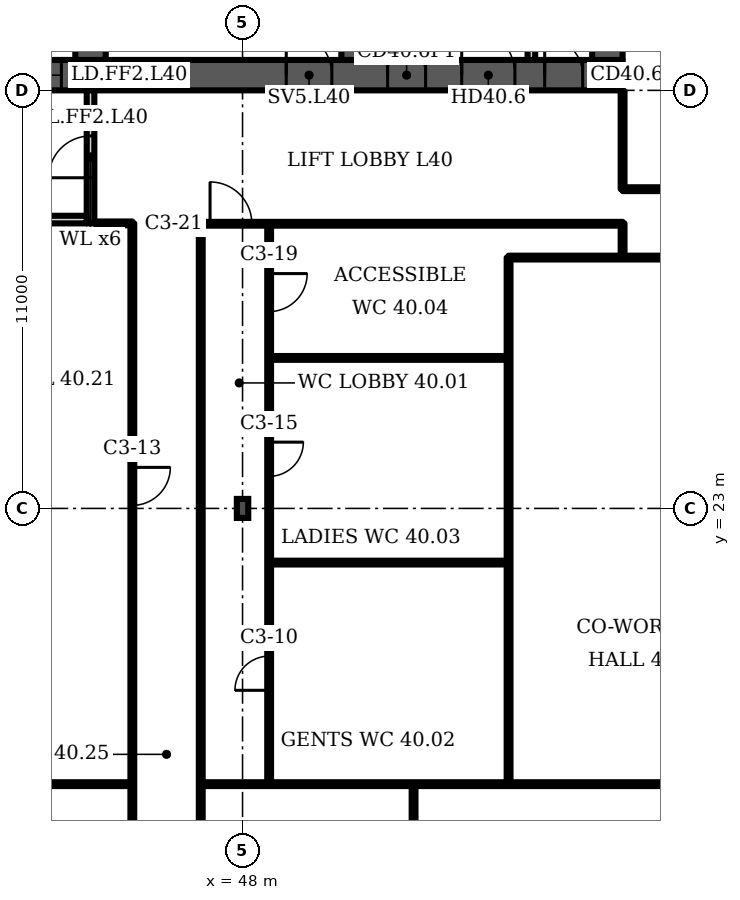
"""IFC4 building model, lengths in metres.
Left out: names, types, materials, properties, quantities, classifications, styles, units other than length and angle.
Written with IfcOpenShell. Run it as: python <this file> out.ifc"""

import sys

from ifc_helpers import new_model, si_unit, direction, frame, frame_2d, origin, origin_2d, place, context, subcontext, project, spatial, polyline, rectangle, i_section, outline, extrude, element, fill, save


model = new_model("IFC4")
c1 = context("Model", 3, precision=1e-05, world=origin(), true_north=direction((0.0, 1.0)))
c2 = subcontext(c1, "Body", "Model", "MODEL_VIEW")
j1 = project(units=[si_unit("LENGTHUNIT", "METRE"), si_unit("PLANEANGLEUNIT", "RADIAN")], contexts=[c1])
p1 = place(None, origin())
s1 = spatial("IfcSite", under=j1, at=p1, CompositionType="ELEMENT")
p2 = place(p1, origin())
s2 = spatial("IfcBuilding", under=s1, at=p2, CompositionType="ELEMENT")
p3 = place(p2, frame((0.0, 0.0, 166.3)))
s3 = spatial("IfcBuildingStorey", under=s2, at=p3, CompositionType="ELEMENT", Elevation=166.3)
p4 = place(p3, frame((16.0, 34.4, 0.0), z_axis=(0.0, 0.0, 1.0), x_axis=(1.0, 0.0, 0.0)))
e1 = element("IfcWall", 1, at=p4, inside=s3, PredefinedType="SHEAR", context=c2, shape_type="SweptSolid", body=[
    extrude(rectangle(XDim=42.0, YDim=0.8, at=frame_2d((21.0, 0.0))), origin(), (0.0, 0.0, 1.0), 3.6),
])
p5 = place(p4, frame((3.2, 0.0, 0.0)))
e2 = element("IfcOpeningElement", 2, at=p5, cuts=e1, PredefinedType="OPENING", context=c2, shape_type="SweptSolid", body=[
    extrude(rectangle(XDim=1.0, YDim=2.1, at=frame_2d((0.5, 1.05))), frame((0.0, 0.41, 0.0), z_axis=(0.0, -1.0, 0.0), x_axis=(1.0, 0.0, 0.0)), (0.0, 0.0, 1.0), 0.82),
])
p6 = place(p4, frame((7.65, 0.0, 0.0)))
e3 = element("IfcOpeningElement", 3, at=p6, cuts=e1, PredefinedType="OPENING", context=c2, shape_type="SweptSolid", body=[
    extrude(rectangle(XDim=1.2, YDim=2.1, at=frame_2d((0.6, 1.05))), frame((0.0, 0.41, 0.0), z_axis=(0.0, -1.0, 0.0), x_axis=(1.0, 0.0, 0.0)), (0.0, 0.0, 1.0), 0.82),
])
p7 = place(p4, frame((14.767, 0.0, 0.0)))
e4 = element("IfcOpeningElement", 4, at=p7, cuts=e1, PredefinedType="OPENING", context=c2, shape_type="SweptSolid", body=[
    extrude(rectangle(XDim=1.1, YDim=2.1, at=frame_2d((0.55, 1.05))), frame((0.0, 0.41, 0.0), z_axis=(0.0, -1.0, 0.0), x_axis=(1.0, 0.0, 0.0)), (0.0, 0.0, 1.0), 0.82),
])
p8 = place(p4, frame((19.133, 0.0, 0.0)))
e5 = element("IfcOpeningElement", 5, at=p8, cuts=e1, PredefinedType="OPENING", context=c2, shape_type="SweptSolid", body=[
    extrude(rectangle(XDim=1.1, YDim=2.1, at=frame_2d((0.55, 1.05))), frame((0.0, 0.41, 0.0), z_axis=(0.0, -1.0, 0.0), x_axis=(1.0, 0.0, 0.0)), (0.0, 0.0, 1.0), 0.82),
])
p9 = place(p4, frame((16.8, 0.0, 0.0)))
e6 = element("IfcOpeningElement", 6, at=p9, cuts=e1, PredefinedType="OPENING", context=c2, shape_type="SweptSolid", body=[
    extrude(rectangle(XDim=1.4, YDim=2.1, at=frame_2d((0.7, 1.05))), frame((0.0, 0.41, 0.0), z_axis=(0.0, -1.0, 0.0), x_axis=(1.0, 0.0, 0.0)), (0.0, 0.0, 1.0), 0.82),
])
p10 = place(p4, frame((21.767, 0.0, 0.0)))
e7 = element("IfcOpeningElement", 7, at=p10, cuts=e1, PredefinedType="OPENING", context=c2, shape_type="SweptSolid", body=[
    extrude(rectangle(XDim=1.1, YDim=2.1, at=frame_2d((0.55, 1.05))), frame((0.0, 0.41, 0.0), z_axis=(0.0, -1.0, 0.0), x_axis=(1.0, 0.0, 0.0)), (0.0, 0.0, 1.0), 0.82),
])
p11 = place(p4, frame((23.95, 0.0, 0.0)))
e8 = element("IfcOpeningElement", 8, at=p11, cuts=e1, PredefinedType="OPENING", context=c2, shape_type="SweptSolid", body=[
    extrude(rectangle(XDim=1.1, YDim=2.1, at=frame_2d((0.55, 1.05))), frame((0.0, 0.41, 0.0), z_axis=(0.0, -1.0, 0.0), x_axis=(1.0, 0.0, 0.0)), (0.0, 0.0, 1.0), 0.82),
])
p12 = place(p4, frame((26.133, 0.0, 0.0)))
e9 = element("IfcOpeningElement", 9, at=p12, cuts=e1, PredefinedType="OPENING", context=c2, shape_type="SweptSolid", body=[
    extrude(rectangle(XDim=1.1, YDim=2.1, at=frame_2d((0.55, 1.05))), frame((0.0, 0.41, 0.0), z_axis=(0.0, -1.0, 0.0), x_axis=(1.0, 0.0, 0.0)), (0.0, 0.0, 1.0), 0.82),
])
p13 = place(p4, frame((33.15, 0.0, 0.0)))
e10 = element("IfcOpeningElement", 10, at=p13, cuts=e1, PredefinedType="OPENING", context=c2, shape_type="SweptSolid", body=[
    extrude(rectangle(XDim=1.2, YDim=2.1, at=frame_2d((0.6, 1.05))), frame((0.0, 0.41, 0.0), z_axis=(0.0, -1.0, 0.0), x_axis=(1.0, 0.0, 0.0)), (0.0, 0.0, 1.0), 0.82),
])
p14 = place(p4, frame((35.817, 0.0, 0.0)))
e11 = element("IfcOpeningElement", 11, at=p14, cuts=e1, PredefinedType="OPENING", context=c2, shape_type="SweptSolid", body=[
    extrude(rectangle(XDim=1.0, YDim=2.1, at=frame_2d((0.5, 1.05))), frame((0.0, 0.41, 0.0), z_axis=(0.0, -1.0, 0.0), x_axis=(1.0, 0.0, 0.0)), (0.0, 0.0, 1.0), 0.82),
])
p15 = place(p4, frame((39.95, 0.0, 0.0)))
e12 = element("IfcOpeningElement", 12, at=p15, cuts=e1, PredefinedType="OPENING", context=c2, shape_type="SweptSolid", body=[
    extrude(rectangle(XDim=1.0, YDim=2.1, at=frame_2d((0.5, 1.05))), frame((0.0, 0.41, 0.0), z_axis=(0.0, -1.0, 0.0), x_axis=(1.0, 0.0, 0.0)), (0.0, 0.0, 1.0), 0.82),
])
p16 = place(p4, frame((37.767, 0.0, 0.0)))
e13 = element("IfcOpeningElement", 13, at=p16, cuts=e1, PredefinedType="OPENING", context=c2, shape_type="SweptSolid", body=[
    extrude(rectangle(XDim=1.4, YDim=2.1, at=frame_2d((0.7, 1.05))), frame((0.0, 0.41, 0.0), z_axis=(0.0, -1.0, 0.0), x_axis=(1.0, 0.0, 0.0)), (0.0, 0.0, 1.0), 0.82),
])
p17 = place(p3, frame((44.0, 34.8, 0.0), z_axis=(0.0, 0.0, 1.0), x_axis=(0.0, 1.0, 0.0)))
e14 = element("IfcWall", 14, at=p17, inside=s3, PredefinedType="SHEAR", context=c2, shape_type="SweptSolid", body=[
    extrude(rectangle(XDim=14.374, YDim=0.8, at=frame_2d((7.187, 0.0))), origin(), (0.0, 0.0, 1.0), 3.6),
])
p18 = place(p17, frame((11.312, 0.0, 0.0)))
e15 = element("IfcOpeningElement", 15, at=p18, cuts=e14, PredefinedType="OPENING", context=c2, shape_type="SweptSolid", body=[
    extrude(rectangle(XDim=1.0, YDim=2.1, at=frame_2d((0.5, 1.05))), frame((0.0, 0.41, 0.0), z_axis=(0.0, -1.0, 0.0), x_axis=(1.0, 0.0, 0.0)), (0.0, 0.0, 1.0), 0.82),
])
p19 = place(p17, frame((3.6, 0.0, 0.0)))
e16 = element("IfcOpeningElement", 16, at=p19, cuts=e14, PredefinedType="OPENING", context=c2, shape_type="SweptSolid", body=[
    extrude(rectangle(XDim=1.1, YDim=2.1, at=frame_2d((0.55, 1.05))), frame((0.0, 0.41, 0.0), z_axis=(0.0, -1.0, 0.0), x_axis=(1.0, 0.0, 0.0)), (0.0, 0.0, 1.0), 0.82),
])
p20 = place(p3, frame((51.0, 34.8, 0.0), z_axis=(0.0, 0.0, 1.0), x_axis=(0.0, 1.0, 0.0)))
e17 = element("IfcWall", 17, at=p20, inside=s3, PredefinedType="SHEAR", context=c2, shape_type="SweptSolid", body=[
    extrude(rectangle(XDim=13.762, YDim=0.8, at=frame_2d((6.881, 0.0))), origin(), (0.0, 0.0, 1.0), 3.6),
])
p21 = place(p20, frame((3.6, 0.0, 0.0)))
e18 = element("IfcOpeningElement", 18, at=p21, cuts=e17, PredefinedType="OPENING", context=c2, shape_type="SweptSolid", body=[
    extrude(rectangle(XDim=1.1, YDim=2.1, at=frame_2d((0.55, 1.05))), frame((0.0, 0.41, 0.0), z_axis=(0.0, -1.0, 0.0), x_axis=(1.0, 0.0, 0.0)), (0.0, 0.0, 1.0), 0.82),
])
p22 = place(p3, frame((57.6, 34.8, 0.0), z_axis=(0.0, 0.0, 1.0), x_axis=(0.0, 1.0, 0.0)))
e19 = element("IfcWall", 19, at=p22, inside=s3, PredefinedType="SHEAR", context=c2, shape_type="SweptSolid", body=[
    extrude(rectangle(XDim=13.184, YDim=0.8, at=frame_2d((6.592, 0.0))), origin(), (0.0, 0.0, 1.0), 3.6),
])
p23 = place(p3, frame((48.0, 23.0, 0.0), z_axis=(0.0, 0.0, 1.0), x_axis=(1.0, 0.0, 0.0)))
e20 = element("IfcColumn", 20, at=p23, inside=s3, PredefinedType="COLUMN", context=c2, shape_type="SweptSolid", body=[
    extrude(i_section(OverallWidth=0.3, OverallDepth=0.5, WebThickness=0.014, FlangeThickness=0.028, FilletRadius=0.027, at=origin_2d()), origin(), (0.0, 0.0, 1.0), 3.6),
])
p24 = place(p3, frame((0.0, 0.0, -0.0)))
e21 = element("IfcWall", 21, at=p24, inside=s3, PredefinedType="PARTITIONING", context=c2, shape_type="SweptSolid", body=[
    extrude(outline(polyline([(41.567, 37.1), (39.433, 37.1), (39.433, 34.8), (39.233, 34.8), (39.233, 37.65), (37.4, 37.65), (37.4, 37.85), (39.233, 37.85), (39.433, 37.85), (39.433, 37.3), (41.567, 37.3), (41.567, 37.55), (41.767, 37.55), (43.6, 37.55), (43.6, 37.35), (41.767, 37.35), (41.767, 34.8), (41.567, 34.8), (41.567, 37.1)])), origin(), (0.0, 0.0, 1.0), 3.2),
])
p25 = place(p3, frame((0.0, 0.0, -0.0)))
e22 = element("IfcWall", 22, at=p25, inside=s3, PredefinedType="PARTITIONING", context=c2, shape_type="SweptSolid", body=[
    extrude(outline(polyline([(53.233, 34.8), (53.233, 37.3), (53.433, 37.3), (53.433, 34.8), (53.233, 34.8)])), origin(), (0.0, 0.0, 1.0), 3.2),
])
p26 = place(p3, frame((0.0, 0.0, -0.0)))
e23 = element("IfcWall", 23, at=p26, inside=s3, PredefinedType="PARTITIONING", context=c2, shape_type="SweptSolid", body=[
    extrude(outline(polyline([(55.5, 34.8), (55.5, 37.3), (55.7, 37.3), (55.7, 34.8), (55.5, 34.8)])), origin(), (0.0, 0.0, 1.0), 3.2),
])
p27 = place(p3, frame((44.0, 30.5, 0.0), z_axis=(0.0, 0.0, 1.0), x_axis=(0.0, 1.0, 0.0)))
e24 = element("IfcWall", 24, at=p27, inside=s3, PredefinedType="PARTITIONING", context=c2, shape_type="SweptSolid", body=[
    extrude(rectangle(XDim=3.5, YDim=0.2, at=frame_2d((1.75, 0.0))), origin(), (0.0, 0.0, 1.0), 3.2),
])
p28 = place(p27, frame((1.2, 0.0, 0.0)))
e25 = element("IfcOpeningElement", 25, at=p28, cuts=e24, PredefinedType="OPENING", context=c2, shape_type="SweptSolid", body=[
    extrude(rectangle(XDim=1.1, YDim=2.1, at=frame_2d((0.55, 1.05))), frame((0.0, 0.11, 0.0), z_axis=(0.0, -1.0, 0.0), x_axis=(1.0, 0.0, 0.0)), (0.0, 0.0, 1.0), 0.22),
])
p29 = place(p3, frame((41.1, 30.6, 0.0), z_axis=(0.0, 0.0, 1.0), x_axis=(1.0, 0.0, 0.0)))
e26 = element("IfcWall", 26, at=p29, inside=s3, PredefinedType="PARTITIONING", context=c2, shape_type="SweptSolid", body=[
    extrude(rectangle(XDim=2.8, YDim=0.2, at=frame_2d((1.4, 0.0))), origin(), (0.0, 0.0, 1.0), 3.2),
])
p30 = place(p3, frame((27.4, 15.745, 0.0), z_axis=(0.0, 0.0, 1.0), x_axis=(1.0, 0.0, 0.0)))
e27 = element("IfcWall", 27, at=p30, inside=s3, PredefinedType="PARTITIONING", context=c2, shape_type="SweptSolid", body=[
    extrude(rectangle(XDim=17.7, YDim=0.1, at=frame_2d((8.85, 0.0))), origin(), (0.0, 0.0, 1.0), 3.2),
])
p31 = place(p3, frame((45.1, 1.087, 0.0), z_axis=(0.0, 0.0, 1.0), x_axis=(0.0, 1.0, 0.0)))
e28 = element("IfcWall", 28, at=p31, inside=s3, PredefinedType="PARTITIONING", context=c2, shape_type="SweptSolid", body=[
    extrude(rectangle(XDim=29.413, YDim=0.1, at=frame_2d((14.707, 0.0))), origin(), (0.0, 0.0, 1.0), 3.2),
])
p32 = place(p31, frame((6.438, 0.0, 0.0)))
e29 = element("IfcOpeningElement", 29, at=p32, cuts=e28, PredefinedType="OPENING", context=c2, shape_type="SweptSolid", body=[
    extrude(rectangle(XDim=1.8, YDim=2.1, at=frame_2d((0.9, 1.05))), frame((0.0, 0.06, 0.0), z_axis=(0.0, -1.0, 0.0), x_axis=(1.0, 0.0, 0.0)), (0.0, 0.0, 1.0), 0.12),
])
p33 = place(p31, frame((21.993, 0.0, 0.0)))
e30 = element("IfcOpeningElement", 30, at=p33, cuts=e28, PredefinedType="OPENING", context=c2, shape_type="SweptSolid", body=[
    extrude(rectangle(XDim=1.0, YDim=2.1, at=frame_2d((0.5, 1.05))), frame((0.0, 0.06, 0.0), z_axis=(0.0, -1.0, 0.0), x_axis=(1.0, 0.0, 0.0)), (0.0, 0.0, 1.0), 0.12),
])
p34 = place(p3, frame((46.9, 1.087, 0.0), z_axis=(0.0, 0.0, 1.0), x_axis=(0.0, 1.0, 0.0)))
e31 = element("IfcWall", 31, at=p34, inside=s3, PredefinedType="PARTITIONING", context=c2, shape_type="SweptSolid", body=[
    extrude(rectangle(XDim=29.403, YDim=0.1, at=frame_2d((14.702, 0.0))), origin(), (0.0, 0.0, 1.0), 3.2),
])
p35 = place(p34, frame((6.798, 0.0, 0.0)))
e32 = element("IfcOpeningElement", 32, at=p35, cuts=e31, PredefinedType="OPENING", context=c2, shape_type="SweptSolid", body=[
    extrude(rectangle(XDim=1.0, YDim=2.1, at=frame_2d((0.5, 1.05))), frame((0.0, 0.06, 0.0), z_axis=(0.0, -1.0, 0.0), x_axis=(1.0, 0.0, 0.0)), (0.0, 0.0, 1.0), 0.12),
])
p36 = place(p3, frame((46.91, 15.745, 0.0), z_axis=(0.0, 0.0, 1.0), x_axis=(1.0, 0.0, 0.0)))
e33 = element("IfcWall", 33, at=p36, inside=s3, PredefinedType="PARTITIONING", context=c2, shape_type="SweptSolid", body=[
    extrude(rectangle(XDim=17.69, YDim=0.1, at=frame_2d((8.845, 0.0))), origin(), (0.0, 0.0, 1.0), 3.2),
])
p37 = place(p3, frame((46.91, 30.49, 0.0), z_axis=(0.0, 0.0, 1.0), x_axis=(1.0, 0.0, 0.0)))
e34 = element("IfcWall", 34, at=p37, inside=s3, PredefinedType="PARTITIONING", context=c2, shape_type="SweptSolid", body=[
    extrude(rectangle(XDim=11.09, YDim=0.1, at=frame_2d((5.545, 0.0))), origin(), (0.0, 0.0, 1.0), 3.2),
])
p38 = place(p37, frame((0.235, 0.0, 0.0)))
e35 = element("IfcOpeningElement", 35, at=p38, cuts=e34, PredefinedType="OPENING", context=c2, shape_type="SweptSolid", body=[
    extrude(rectangle(XDim=1.1, YDim=2.1, at=frame_2d((0.55, 1.05))), frame((0.0, 0.06, 0.0), z_axis=(0.0, -1.0, 0.0), x_axis=(1.0, 0.0, 0.0)), (0.0, 0.0, 1.0), 0.12),
])
p39 = place(p3, frame((48.7, 15.745, 0.0), z_axis=(0.0, 0.0, 1.0), x_axis=(0.0, 1.0, 0.0)))
e36 = element("IfcWall", 36, at=p39, inside=s3, PredefinedType="PARTITIONING", context=c2, shape_type="SweptSolid", body=[
    extrude(rectangle(XDim=14.745, YDim=0.1, at=frame_2d((7.373, 0.0))), origin(), (0.0, 0.0, 1.0), 3.2),
])
p40 = place(p39, frame((2.469, 0.0, 0.0)))
e37 = element("IfcOpeningElement", 37, at=p40, cuts=e36, PredefinedType="OPENING", context=c2, shape_type="SweptSolid", body=[
    extrude(rectangle(XDim=0.9, YDim=2.1, at=frame_2d((0.45, 1.05))), frame((0.0, 0.06, 0.0), z_axis=(0.0, -1.0, 0.0), x_axis=(1.0, 0.0, 0.0)), (0.0, 0.0, 1.0), 0.12),
])
p41 = place(p39, frame((8.099, 0.0, 0.0)))
e38 = element("IfcOpeningElement", 38, at=p41, cuts=e36, PredefinedType="OPENING", context=c2, shape_type="SweptSolid", body=[
    extrude(rectangle(XDim=0.9, YDim=2.1, at=frame_2d((0.45, 1.05))), frame((0.0, 0.06, 0.0), z_axis=(0.0, -1.0, 0.0), x_axis=(1.0, 0.0, 0.0)), (0.0, 0.0, 1.0), 0.12),
])
p42 = place(p39, frame((12.434, 0.0, 0.0)))
e39 = element("IfcOpeningElement", 39, at=p42, cuts=e36, PredefinedType="OPENING", context=c2, shape_type="SweptSolid", body=[
    extrude(rectangle(XDim=1.0, YDim=2.1, at=frame_2d((0.5, 1.05))), frame((0.0, 0.06, 0.0), z_axis=(0.0, -1.0, 0.0), x_axis=(1.0, 0.0, 0.0)), (0.0, 0.0, 1.0), 0.12),
])
for number, where, z_axis, x_axis in (
    (40, (48.7, 21.575, 0.0), (0.0, 0.0, 1.0), (1.0, 0.0, 0.0)),
    (41, (48.7, 26.96, 0.0), (0.0, 0.0, 1.0), (1.0, 0.0, 0.0)),
):
    element("IfcWall", number, at=place(p3, frame(where, z_axis=z_axis, x_axis=x_axis)), inside=s3, PredefinedType="PARTITIONING", context=c2, shape_type="SweptSolid", body=[
        extrude(rectangle(XDim=6.3, YDim=0.1, at=frame_2d((3.15, 0.0))), origin(), (0.0, 0.0, 1.0), 3.2),
    ])
p43 = place(p3, frame((52.5, 1.98, 0.0), z_axis=(0.0, 0.0, 1.0), x_axis=(0.0, 1.0, 0.0)))
e42 = element("IfcWall", 42, at=p43, inside=s3, PredefinedType="PARTITIONING", context=c2, shape_type="SweptSolid", body=[
    extrude(rectangle(XDim=13.765, YDim=0.1, at=frame_2d((6.883, 0.0))), origin(), (0.0, 0.0, 1.0), 3.2),
])
p44 = place(p3, frame((55.0, 15.745, 0.0), z_axis=(0.0, 0.0, 1.0), x_axis=(0.0, 1.0, 0.0)))
e43 = element("IfcWall", 43, at=p44, inside=s3, PredefinedType="PARTITIONING", context=c2, shape_type="SweptSolid", body=[
    extrude(rectangle(XDim=13.855, YDim=0.1, at=frame_2d((6.927, 0.0))), origin(), (0.0, 0.0, 1.0), 3.2),
])
p45 = place(p3, frame((55.0, 29.6, 0.0), z_axis=(0.0, 0.0, 1.0), x_axis=(1.0, 0.0, 0.0)))
e44 = element("IfcWall", 44, at=p45, inside=s3, PredefinedType="PARTITIONING", context=c2, shape_type="SweptSolid", body=[
    extrude(rectangle(XDim=6.44, YDim=0.1, at=frame_2d((3.22, 0.0))), origin(), (0.0, 0.0, 1.0), 3.2),
])
p46 = place(p3, frame((58.0, 29.6, 0.0), z_axis=(0.0, 0.0, 1.0), x_axis=(0.0, 1.0, 0.0)))
e45 = element("IfcWall", 45, at=p46, inside=s3, PredefinedType="PARTITIONING", context=c2, shape_type="SweptSolid", body=[
    extrude(rectangle(XDim=0.9, YDim=0.1, at=frame_2d((0.45, 0.0))), origin(), (0.0, 0.0, 1.0), 3.2),
])
p47 = place(p3, frame((58.0, 31.4, 0.0), z_axis=(0.0, 0.0, 1.0), x_axis=(0.0, 1.0, 0.0)))
e46 = element("IfcWall", 46, at=p47, inside=s3, PredefinedType="PARTITIONING", context=c2, shape_type="SweptSolid", body=[
    extrude(rectangle(XDim=2.58, YDim=0.1, at=frame_2d((1.29, 0.0))), origin(), (0.0, 0.0, 1.0), 3.2),
])
p48 = place(p3, frame((58.0, 31.4, 0.0), z_axis=(0.0, 0.0, 1.0), x_axis=(1.0, 0.0, 0.0)))
e47 = element("IfcWall", 47, at=p48, inside=s3, PredefinedType="PARTITIONING", context=c2, shape_type="SweptSolid", body=[
    extrude(rectangle(XDim=8.4, YDim=0.1, at=frame_2d((4.2, 0.0))), origin(), (0.0, 0.0, 1.0), 3.2),
])
p49 = place(p48, frame((3.98, 0.0, 0.0)))
e48 = element("IfcOpeningElement", 48, at=p49, cuts=e47, PredefinedType="OPENING", context=c2, shape_type="SweptSolid", body=[
    extrude(rectangle(XDim=1.8, YDim=2.1, at=frame_2d((0.9, 1.05))), frame((0.0, 0.06, 0.0), z_axis=(0.0, -1.0, 0.0), x_axis=(1.0, 0.0, 0.0)), (0.0, 0.0, 1.0), 0.12),
])
p50 = place(p3, frame((44.15, 30.5, 0.0), z_axis=(0.0, 0.0, 1.0), x_axis=(1.0, 0.0, 0.0)))
e49 = element("IfcWall", 49, at=p50, inside=s3, PredefinedType="PARTITIONING", context=c2, shape_type="SweptSolid", body=[
    extrude(rectangle(XDim=0.95, YDim=0.1, at=frame_2d((0.475, 0.0))), origin(), (0.0, 0.0, 1.0), 3.2),
])
p51 = place(p12, origin())
e50 = element("IfcDoor", 50, at=p51, inside=s3, OperationType="DOUBLE_DOOR_SLIDING", PredefinedType="DOOR", context=c2, shape_type="SweptSolid", body=[
    extrude(rectangle(XDim=1.1, YDim=2.1, at=frame_2d((0.55, 1.05))), frame((0.0, 0.025, 0.0), z_axis=(0.0, -1.0, 0.0), x_axis=(1.0, 0.0, 0.0)), (0.0, 0.0, 1.0), 0.05),
])
fill(e9, e50)
p52 = place(p13, origin())
e51 = element("IfcDoor", 51, at=p52, inside=s3, OperationType="SINGLE_SWING_LEFT", PredefinedType="DOOR", context=c2, shape_type="SweptSolid", body=[
    extrude(rectangle(XDim=1.2, YDim=2.1, at=frame_2d((0.6, 1.05))), frame((0.0, 0.025, 0.0), z_axis=(0.0, -1.0, 0.0), x_axis=(1.0, 0.0, 0.0)), (0.0, 0.0, 1.0), 0.05),
])
fill(e10, e51)
p53 = place(p14, origin())
e52 = element("IfcDoor", 52, at=p53, inside=s3, OperationType="SINGLE_SWING_LEFT", PredefinedType="DOOR", context=c2, shape_type="SweptSolid", body=[
    extrude(rectangle(XDim=1.0, YDim=2.1, at=frame_2d((0.5, 1.05))), frame((0.0, 0.4, 0.0), z_axis=(0.0, -1.0, 0.0), x_axis=(1.0, 0.0, 0.0)), (0.0, 0.0, 1.0), 0.8),
])
fill(e11, e52)
p54 = place(p15, origin())
e53 = element("IfcDoor", 53, at=p54, inside=s3, OperationType="SINGLE_SWING_LEFT", PredefinedType="DOOR", context=c2, shape_type="SweptSolid", body=[
    extrude(rectangle(XDim=1.0, YDim=2.1, at=frame_2d((0.5, 1.05))), frame((0.0, 0.4, 0.0), z_axis=(0.0, -1.0, 0.0), x_axis=(1.0, 0.0, 0.0)), (0.0, 0.0, 1.0), 0.8),
])
fill(e12, e53)
p55 = place(p16, origin())
e54 = element("IfcDoor", 54, at=p55, inside=s3, OperationType="DOUBLE_DOOR_SINGLE_SWING", PredefinedType="DOOR", context=c2, shape_type="SweptSolid", body=[
    extrude(rectangle(XDim=1.4, YDim=2.1, at=frame_2d((0.7, 1.05))), frame((0.0, 0.025, 0.0), z_axis=(0.0, -1.0, 0.0), x_axis=(1.0, 0.0, 0.0)), (0.0, 0.0, 1.0), 0.05),
])
fill(e13, e54)
p56 = place(p28, origin())
e55 = element("IfcDoor", 55, at=p56, inside=s3, OperationType="SINGLE_SWING_LEFT", PredefinedType="DOOR", context=c2, shape_type="SweptSolid", body=[
    extrude(rectangle(XDim=1.1, YDim=2.1, at=frame_2d((0.55, 1.05))), frame((0.0, 0.025, 0.0), z_axis=(0.0, -1.0, 0.0), x_axis=(1.0, 0.0, 0.0)), (0.0, 0.0, 1.0), 0.05),
])
fill(e25, e55)
p57 = place(p40, origin())
e56 = element("IfcDoor", 56, at=p57, inside=s3, OperationType="SINGLE_SWING_LEFT", PredefinedType="DOOR", context=c2, shape_type="SweptSolid", body=[
    extrude(rectangle(XDim=0.9, YDim=2.1, at=frame_2d((0.45, 1.05))), frame((0.0, 0.025, 0.0), z_axis=(0.0, -1.0, 0.0), x_axis=(1.0, 0.0, 0.0)), (0.0, 0.0, 1.0), 0.05),
])
fill(e37, e56)
p58 = place(p33, origin())
e57 = element("IfcDoor", 57, at=p58, inside=s3, OperationType="SINGLE_SWING_RIGHT", PredefinedType="DOOR", context=c2, shape_type="SweptSolid", body=[
    extrude(rectangle(XDim=1.0, YDim=2.1, at=frame_2d((0.5, 1.05))), frame((0.0, 0.025, 0.0), z_axis=(0.0, -1.0, 0.0), x_axis=(1.0, 0.0, 0.0)), (0.0, 0.0, 1.0), 0.05),
])
fill(e30, e57)
p59 = place(p41, origin())
e58 = element("IfcDoor", 58, at=p59, inside=s3, OperationType="SINGLE_SWING_RIGHT", PredefinedType="DOOR", context=c2, shape_type="SweptSolid", body=[
    extrude(rectangle(XDim=0.9, YDim=2.1, at=frame_2d((0.45, 1.05))), frame((0.0, 0.025, 0.0), z_axis=(0.0, -1.0, 0.0), x_axis=(1.0, 0.0, 0.0)), (0.0, 0.0, 1.0), 0.05),
])
fill(e38, e58)
p60 = place(p42, origin())
e59 = element("IfcDoor", 59, at=p60, inside=s3, OperationType="SINGLE_SWING_RIGHT", PredefinedType="DOOR", context=c2, shape_type="SweptSolid", body=[
    extrude(rectangle(XDim=1.0, YDim=2.1, at=frame_2d((0.5, 1.05))), frame((0.0, 0.025, 0.0), z_axis=(0.0, -1.0, 0.0), x_axis=(1.0, 0.0, 0.0)), (0.0, 0.0, 1.0), 0.05),
])
fill(e39, e59)
p61 = place(p38, origin())
e60 = element("IfcDoor", 60, at=p61, inside=s3, OperationType="SINGLE_SWING_LEFT", PredefinedType="DOOR", context=c2, shape_type="SweptSolid", body=[
    extrude(rectangle(XDim=1.1, YDim=2.1, at=frame_2d((0.55, 1.05))), frame((0.0, 0.025, 0.0), z_axis=(0.0, -1.0, 0.0), x_axis=(1.0, 0.0, 0.0)), (0.0, 0.0, 1.0), 0.05),
])
fill(e35, e60)
save(model, sys.argv[1])
